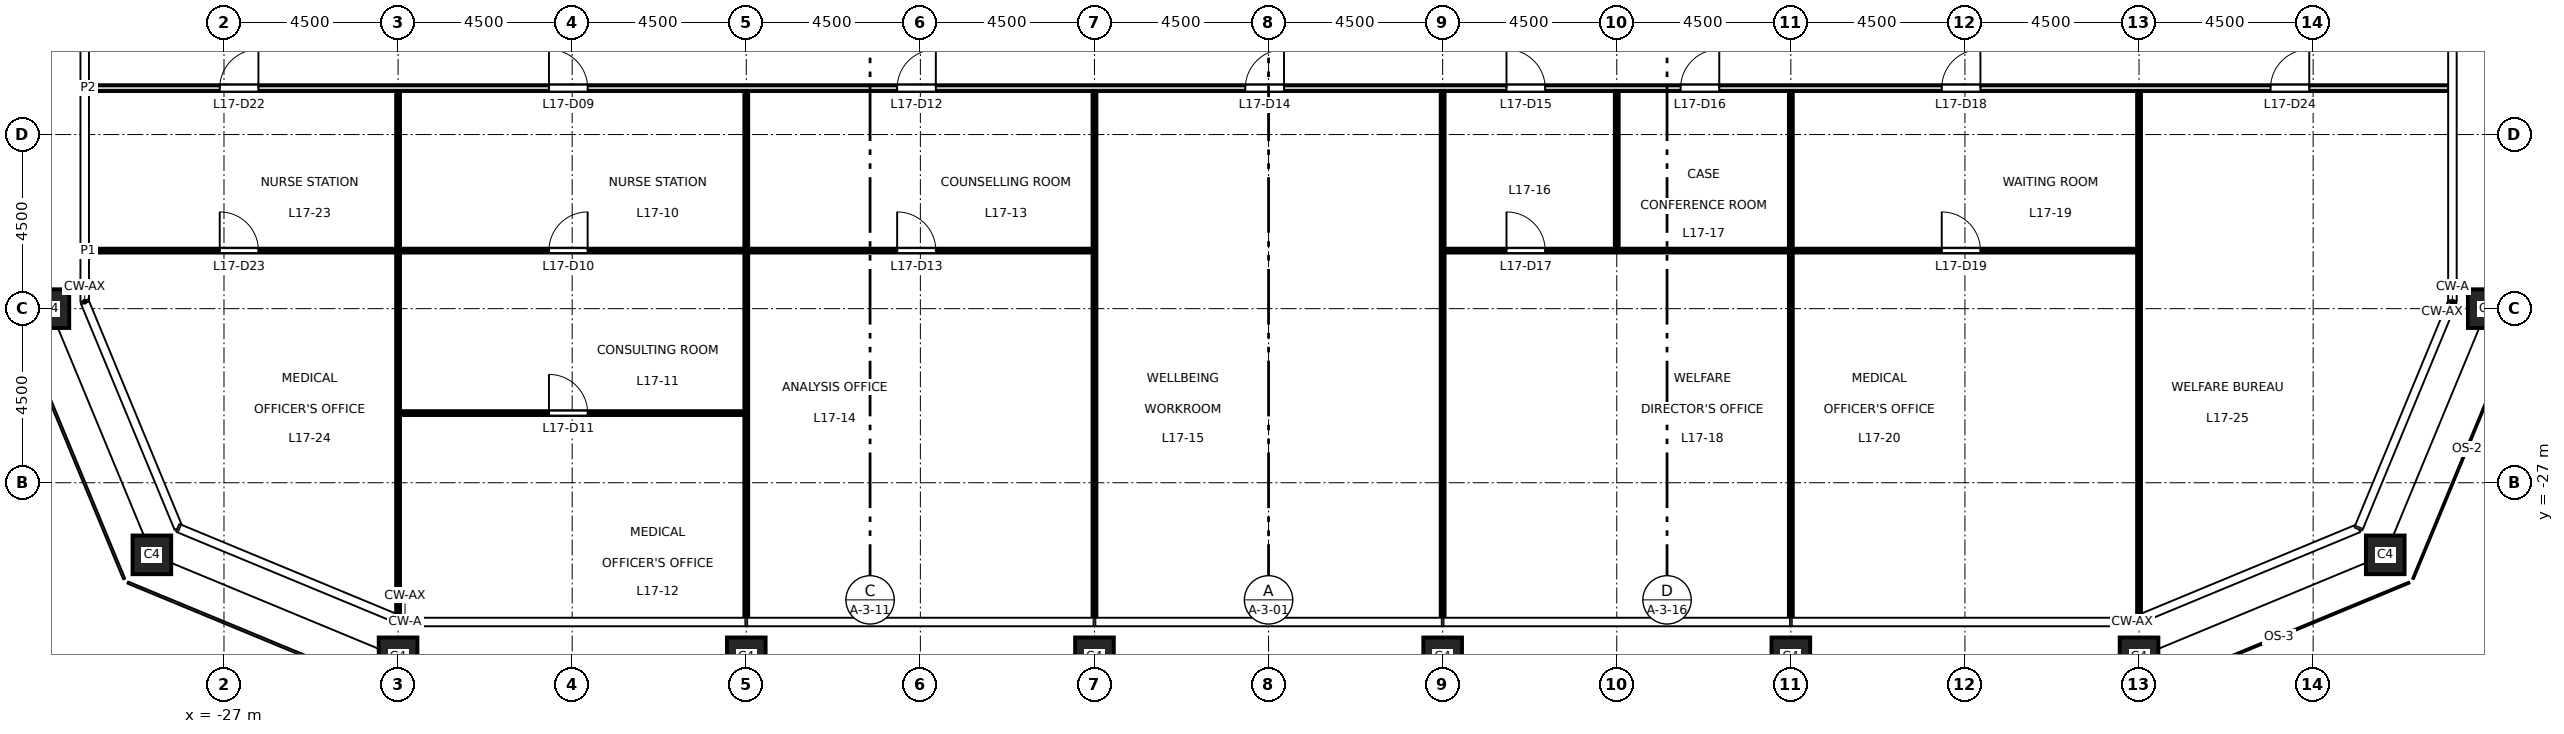
"""IFC4 building model, lengths in metres.
Left out: names, types, materials, properties, quantities, classifications, styles, units other than length and angle.
Written with IfcOpenShell. Run it as: python <this file> out.ifc"""

import sys

from ifc_helpers import new_model, si_unit, direction, frame, frame_2d, origin, origin_2d, place, context, subcontext, project, spatial, rectangle, hollow_rectangle, extrude, element, fill, save


model = new_model("IFC4")
c1 = context("Model", 3, precision=1e-05, world=origin(), true_north=direction((0.0, 1.0)))
c2 = subcontext(c1, "Body", "Model", "MODEL_VIEW")
j1 = project(units=[si_unit("LENGTHUNIT", "METRE"), si_unit("PLANEANGLEUNIT", "RADIAN")], contexts=[c1])
p1 = place(None, origin())
s1 = spatial("IfcSite", under=j1, at=p1, CompositionType="ELEMENT")
p2 = place(p1, origin())
s2 = spatial("IfcBuilding", under=s1, at=p2, CompositionType="ELEMENT")
p3 = place(p2, frame((0.0, 0.0, 80.7)))
s3 = spatial("IfcBuildingStorey", under=s2, at=p3, CompositionType="ELEMENT", Elevation=80.7)
for number, where, z_axis, x_axis in (
    (1, (-22.5, -31.5, 0.0), (0.0, 0.0, 1.0), (1.0, 0.0, 0.0)),
    (2, (-13.5, -31.5, 0.0), (0.0, 0.0, 1.0), (1.0, 0.0, 0.0)),
    (3, (-4.5, -31.5, 0.0), (0.0, 0.0, 1.0), (1.0, 0.0, 0.0)),
    (4, (4.5, -31.5, 0.0), (0.0, 0.0, 1.0), (1.0, 0.0, 0.0)),
    (5, (13.5, -31.5, 0.0), (0.0, 0.0, 1.0), (1.0, 0.0, 0.0)),
    (6, (22.5, -31.5, 0.0), (0.0, 0.0, 1.0), (1.0, 0.0, 0.0)),
    (7, (28.864, -28.864, 0.0), (0.0, 0.0, 1.0), (1.0, 0.0, 0.0)),
    (8, (31.5, -22.5, 0.0), (0.0, 0.0, 1.0), (1.0, 0.0, 0.0)),
    (9, (-31.5, -22.5, 0.0), (0.0, 0.0, 1.0), (1.0, 0.0, 0.0)),
    (10, (-28.864, -28.864, 0.0), (0.0, 0.0, 1.0), (1.0, 0.0, 0.0)),
):
    element("IfcColumn", number, at=place(p3, frame(where, z_axis=z_axis, x_axis=x_axis)), inside=s3, PredefinedType="COLUMN", context=c2, shape_type="SweptSolid", body=[
        extrude(hollow_rectangle(XDim=1.0, YDim=1.0, WallThickness=0.06, at=origin_2d()), origin(), (0.0, 0.0, 1.0), 4.5),
    ])
p4 = place(p3, frame((-22.45, -25.2, 0.0), z_axis=(0.0, 0.0, 1.0), x_axis=(1.0, 0.0, 0.0)))
e11 = element("IfcWall", 11, at=p4, inside=s3, PredefinedType="PARTITIONING", context=c2, shape_type="SweptSolid", body=[
    extrude(rectangle(XDim=8.9, YDim=0.1, at=frame_2d((4.45, 0.0))), origin(), (0.0, 0.0, 1.0), 4.35),
])
p5 = place(p4, frame((3.85, 0.0, 0.0)))
e12 = element("IfcOpeningElement", 12, at=p5, cuts=e11, PredefinedType="OPENING", context=c2, shape_type="SweptSolid", body=[
    extrude(rectangle(XDim=1.0, YDim=2.1, at=frame_2d((0.5, 1.05))), frame((0.0, 0.06, 0.0), z_axis=(0.0, -1.0, 0.0), x_axis=(1.0, 0.0, 0.0)), (0.0, 0.0, 1.0), 0.12),
])
p6 = place(p3, frame((-30.51, -21.0, 0.0), z_axis=(0.0, 0.0, 1.0), x_axis=(1.0, 0.0, 0.0)))
e13 = element("IfcWall", 13, at=p6, inside=s3, PredefinedType="PARTITIONING", context=c2, shape_type="SweptSolid", body=[
    extrude(rectangle(XDim=25.96, YDim=0.1, at=frame_2d((12.98, 0.0))), origin(), (0.0, 0.0, 1.0), 4.35),
])
p7 = place(p6, frame((11.91, 0.0, 0.0)))
e14 = element("IfcOpeningElement", 14, at=p7, cuts=e13, PredefinedType="OPENING", context=c2, shape_type="SweptSolid", body=[
    extrude(rectangle(XDim=1.0, YDim=2.1, at=frame_2d((0.5, 1.05))), frame((0.0, 0.06, 0.0), z_axis=(0.0, -1.0, 0.0), x_axis=(1.0, 0.0, 0.0)), (0.0, 0.0, 1.0), 0.12),
])
p8 = place(p6, frame((20.91, 0.0, 0.0)))
e15 = element("IfcOpeningElement", 15, at=p8, cuts=e13, PredefinedType="OPENING", context=c2, shape_type="SweptSolid", body=[
    extrude(rectangle(XDim=1.0, YDim=2.1, at=frame_2d((0.5, 1.05))), frame((0.0, 0.06, 0.0), z_axis=(0.0, -1.0, 0.0), x_axis=(1.0, 0.0, 0.0)), (0.0, 0.0, 1.0), 0.12),
])
p9 = place(p6, frame((3.4, 0.0, 0.0)))
e16 = element("IfcOpeningElement", 16, at=p9, cuts=e13, PredefinedType="OPENING", context=c2, shape_type="SweptSolid", body=[
    extrude(rectangle(XDim=1.0, YDim=2.1, at=frame_2d((0.5, 1.05))), frame((0.0, 0.06, 0.0), z_axis=(0.0, -1.0, 0.0), x_axis=(1.0, 0.0, 0.0)), (0.0, 0.0, 1.0), 0.12),
])
p10 = place(p3, frame((4.55, -21.0, 0.0), z_axis=(0.0, 0.0, 1.0), x_axis=(1.0, 0.0, 0.0)))
e17 = element("IfcWall", 17, at=p10, inside=s3, PredefinedType="PARTITIONING", context=c2, shape_type="SweptSolid", body=[
    extrude(rectangle(XDim=17.9, YDim=0.1, at=frame_2d((8.95, 0.0))), origin(), (0.0, 0.0, 1.0), 4.35),
])
p11 = place(p10, frame((1.6, 0.0, 0.0)))
e18 = element("IfcOpeningElement", 18, at=p11, cuts=e17, PredefinedType="OPENING", context=c2, shape_type="SweptSolid", body=[
    extrude(rectangle(XDim=1.0, YDim=2.1, at=frame_2d((0.5, 1.05))), frame((0.0, 0.06, 0.0), z_axis=(0.0, -1.0, 0.0), x_axis=(1.0, 0.0, 0.0)), (0.0, 0.0, 1.0), 0.12),
])
p12 = place(p10, frame((12.85, 0.0, 0.0)))
e19 = element("IfcOpeningElement", 19, at=p12, cuts=e17, PredefinedType="OPENING", context=c2, shape_type="SweptSolid", body=[
    extrude(rectangle(XDim=1.0, YDim=2.1, at=frame_2d((0.5, 1.05))), frame((0.0, 0.06, 0.0), z_axis=(0.0, -1.0, 0.0), x_axis=(1.0, 0.0, 0.0)), (0.0, 0.0, 1.0), 0.12),
])
p13 = place(p3, frame((-30.51, -16.8, 0.0), z_axis=(0.0, 0.0, 1.0), x_axis=(1.0, 0.0, 0.0)))
e20 = element("IfcWall", 20, at=p13, inside=s3, PredefinedType="PARTITIONING", context=c2, shape_type="SweptSolid", body=[
    extrude(rectangle(XDim=61.02, YDim=0.15, at=frame_2d((30.51, 0.0))), origin(), (0.0, 0.0, 1.0), 4.35),
])
p14 = place(p13, frame((11.91, 0.0, 0.0)))
e21 = element("IfcOpeningElement", 21, at=p14, cuts=e20, PredefinedType="OPENING", context=c2, shape_type="SweptSolid", body=[
    extrude(rectangle(XDim=1.0, YDim=2.1, at=frame_2d((0.5, 1.05))), frame((0.0, 0.085, 0.0), z_axis=(0.0, -1.0, 0.0), x_axis=(1.0, 0.0, 0.0)), (0.0, 0.0, 1.0), 0.17),
])
p15 = place(p13, frame((20.91, 0.0, 0.0)))
e22 = element("IfcOpeningElement", 22, at=p15, cuts=e20, PredefinedType="OPENING", context=c2, shape_type="SweptSolid", body=[
    extrude(rectangle(XDim=1.0, YDim=2.1, at=frame_2d((0.5, 1.05))), frame((0.0, 0.085, 0.0), z_axis=(0.0, -1.0, 0.0), x_axis=(1.0, 0.0, 0.0)), (0.0, 0.0, 1.0), 0.17),
])
p16 = place(p13, frame((29.91, 0.0, 0.0)))
e23 = element("IfcOpeningElement", 23, at=p16, cuts=e20, PredefinedType="OPENING", context=c2, shape_type="SweptSolid", body=[
    extrude(rectangle(XDim=1.0, YDim=2.1, at=frame_2d((0.5, 1.05))), frame((0.0, 0.085, 0.0), z_axis=(0.0, -1.0, 0.0), x_axis=(1.0, 0.0, 0.0)), (0.0, 0.0, 1.0), 0.17),
])
p17 = place(p13, frame((36.66, 0.0, 0.0)))
e24 = element("IfcOpeningElement", 24, at=p17, cuts=e20, PredefinedType="OPENING", context=c2, shape_type="SweptSolid", body=[
    extrude(rectangle(XDim=1.0, YDim=2.1, at=frame_2d((0.5, 1.05))), frame((0.0, 0.085, 0.0), z_axis=(0.0, -1.0, 0.0), x_axis=(1.0, 0.0, 0.0)), (0.0, 0.0, 1.0), 0.17),
])
p18 = place(p13, frame((41.16, 0.0, 0.0)))
e25 = element("IfcOpeningElement", 25, at=p18, cuts=e20, PredefinedType="OPENING", context=c2, shape_type="SweptSolid", body=[
    extrude(rectangle(XDim=1.0, YDim=2.1, at=frame_2d((0.5, 1.05))), frame((0.0, 0.085, 0.0), z_axis=(0.0, -1.0, 0.0), x_axis=(1.0, 0.0, 0.0)), (0.0, 0.0, 1.0), 0.17),
])
p19 = place(p13, frame((47.91, 0.0, 0.0)))
e26 = element("IfcOpeningElement", 26, at=p19, cuts=e20, PredefinedType="OPENING", context=c2, shape_type="SweptSolid", body=[
    extrude(rectangle(XDim=1.0, YDim=2.1, at=frame_2d((0.5, 1.05))), frame((0.0, 0.085, 0.0), z_axis=(0.0, -1.0, 0.0), x_axis=(1.0, 0.0, 0.0)), (0.0, 0.0, 1.0), 0.17),
])
p20 = place(p13, frame((3.4, 0.0, 0.0)))
e27 = element("IfcOpeningElement", 27, at=p20, cuts=e20, PredefinedType="OPENING", context=c2, shape_type="SweptSolid", body=[
    extrude(rectangle(XDim=1.0, YDim=2.1, at=frame_2d((0.5, 1.05))), frame((0.0, 0.085, 0.0), z_axis=(0.0, -1.0, 0.0), x_axis=(1.0, 0.0, 0.0)), (0.0, 0.0, 1.0), 0.17),
])
p21 = place(p13, frame((56.41, 0.0, 0.0)))
e28 = element("IfcOpeningElement", 28, at=p21, cuts=e20, PredefinedType="OPENING", context=c2, shape_type="SweptSolid", body=[
    extrude(rectangle(XDim=1.0, YDim=2.1, at=frame_2d((0.5, 1.05))), frame((0.0, 0.085, 0.0), z_axis=(0.0, -1.0, 0.0), x_axis=(1.0, 0.0, 0.0)), (0.0, 0.0, 1.0), 0.17),
])
p22 = place(p3, frame((-22.5, -30.428, 0.0), z_axis=(0.0, 0.0, 1.0), x_axis=(0.0, 1.0, 0.0)))
e29 = element("IfcWall", 29, at=p22, inside=s3, PredefinedType="PARTITIONING", context=c2, shape_type="SweptSolid", body=[
    extrude(rectangle(XDim=9.378, YDim=0.1, at=frame_2d((4.689, 0.0))), origin(), (0.0, 0.0, 1.0), 3.35),
])
p23 = place(p3, frame((-22.5, -20.95, 0.0), z_axis=(0.0, 0.0, 1.0), x_axis=(0.0, 1.0, 0.0)))
e30 = element("IfcWall", 30, at=p23, inside=s3, PredefinedType="PARTITIONING", context=c2, shape_type="SweptSolid", body=[
    extrude(rectangle(XDim=4.075, YDim=0.1, at=frame_2d((2.038, 0.0))), origin(), (0.0, 0.0, 1.0), 3.35),
])
p24 = place(p3, frame((-13.5, -30.51, 0.0), z_axis=(0.0, 0.0, 1.0), x_axis=(0.0, 1.0, 0.0)))
e31 = element("IfcWall", 31, at=p24, inside=s3, PredefinedType="PARTITIONING", context=c2, shape_type="SweptSolid", body=[
    extrude(rectangle(XDim=9.46, YDim=0.1, at=frame_2d((4.73, 0.0))), origin(), (0.0, 0.0, 1.0), 3.35),
])
p25 = place(p3, frame((-13.5, -20.95, 0.0), z_axis=(0.0, 0.0, 1.0), x_axis=(0.0, 1.0, 0.0)))
e32 = element("IfcWall", 32, at=p25, inside=s3, PredefinedType="PARTITIONING", context=c2, shape_type="SweptSolid", body=[
    extrude(rectangle(XDim=4.075, YDim=0.1, at=frame_2d((2.038, 0.0))), origin(), (0.0, 0.0, 1.0), 3.35),
])
for number, where, z_axis, x_axis in (
    (33, (-4.5, -30.51, 0.0), (0.0, 0.0, 1.0), (0.0, 1.0, 0.0)),
    (34, (4.5, -30.51, 0.0), (0.0, 0.0, 1.0), (0.0, 1.0, 0.0)),
):
    element("IfcWall", number, at=place(p3, frame(where, z_axis=z_axis, x_axis=x_axis)), inside=s3, PredefinedType="PARTITIONING", context=c2, shape_type="SweptSolid", body=[
        extrude(rectangle(XDim=13.635, YDim=0.1, at=frame_2d((6.817, 0.0))), origin(), (0.0, 0.0, 1.0), 3.35),
    ])
p26 = place(p3, frame((9.0, -20.95, 0.0), z_axis=(0.0, 0.0, 1.0), x_axis=(0.0, 1.0, 0.0)))
e35 = element("IfcWall", 35, at=p26, inside=s3, PredefinedType="PARTITIONING", context=c2, shape_type="SweptSolid", body=[
    extrude(rectangle(XDim=4.075, YDim=0.1, at=frame_2d((2.038, 0.0))), origin(), (0.0, 0.0, 1.0), 4.35),
])
p27 = place(p3, frame((13.5, -30.51, 0.0), z_axis=(0.0, 0.0, 1.0), x_axis=(0.0, 1.0, 0.0)))
e36 = element("IfcWall", 36, at=p27, inside=s3, PredefinedType="PARTITIONING", context=c2, shape_type="SweptSolid", body=[
    extrude(rectangle(XDim=9.46, YDim=0.1, at=frame_2d((4.73, 0.0))), origin(), (0.0, 0.0, 1.0), 3.35),
])
p28 = place(p3, frame((13.5, -20.95, 0.0), z_axis=(0.0, 0.0, 1.0), x_axis=(0.0, 1.0, 0.0)))
e37 = element("IfcWall", 37, at=p28, inside=s3, PredefinedType="PARTITIONING", context=c2, shape_type="SweptSolid", body=[
    extrude(rectangle(XDim=4.075, YDim=0.1, at=frame_2d((2.038, 0.0))), origin(), (0.0, 0.0, 1.0), 3.35),
])
p29 = place(p3, frame((22.5, -30.428, 0.0), z_axis=(0.0, 0.0, 1.0), x_axis=(0.0, 1.0, 0.0)))
e38 = element("IfcWall", 38, at=p29, inside=s3, PredefinedType="PARTITIONING", context=c2, shape_type="SweptSolid", body=[
    extrude(rectangle(XDim=13.553, YDim=0.1, at=frame_2d((6.776, 0.0))), origin(), (0.0, 0.0, 1.0), 3.35),
])
p30 = place(p14, origin())
e39 = element("IfcDoor", 39, at=p30, inside=s3, OperationType="SINGLE_SWING_LEFT", PredefinedType="DOOR", context=c2, shape_type="SweptSolid", body=[
    extrude(rectangle(XDim=1.0, YDim=2.1, at=frame_2d((0.5, 1.05))), frame((0.0, 0.025, 0.0), z_axis=(0.0, -1.0, 0.0), x_axis=(1.0, 0.0, 0.0)), (0.0, 0.0, 1.0), 0.05),
])
fill(e21, e39)
p31 = place(p7, origin())
e40 = element("IfcDoor", 40, at=p31, inside=s3, OperationType="SINGLE_SWING_RIGHT", PredefinedType="DOOR", context=c2, shape_type="SweptSolid", body=[
    extrude(rectangle(XDim=1.0, YDim=2.1, at=frame_2d((0.5, 1.05))), frame((0.0, 0.025, 0.0), z_axis=(0.0, -1.0, 0.0), x_axis=(1.0, 0.0, 0.0)), (0.0, 0.0, 1.0), 0.05),
])
fill(e14, e40)
p32 = place(p5, origin())
e41 = element("IfcDoor", 41, at=p32, inside=s3, OperationType="SINGLE_SWING_LEFT", PredefinedType="DOOR", context=c2, shape_type="SweptSolid", body=[
    extrude(rectangle(XDim=1.0, YDim=2.1, at=frame_2d((0.5, 1.05))), frame((0.0, 0.025, 0.0), z_axis=(0.0, -1.0, 0.0), x_axis=(1.0, 0.0, 0.0)), (0.0, 0.0, 1.0), 0.05),
])
fill(e12, e41)
p33 = place(p15, origin())
e42 = element("IfcDoor", 42, at=p33, inside=s3, OperationType="SINGLE_SWING_RIGHT", PredefinedType="DOOR", context=c2, shape_type="SweptSolid", body=[
    extrude(rectangle(XDim=1.0, YDim=2.1, at=frame_2d((0.5, 1.05))), frame((0.0, 0.025, 0.0), z_axis=(0.0, -1.0, 0.0), x_axis=(1.0, 0.0, 0.0)), (0.0, 0.0, 1.0), 0.05),
])
fill(e22, e42)
p34 = place(p8, origin())
e43 = element("IfcDoor", 43, at=p34, inside=s3, OperationType="SINGLE_SWING_LEFT", PredefinedType="DOOR", context=c2, shape_type="SweptSolid", body=[
    extrude(rectangle(XDim=1.0, YDim=2.1, at=frame_2d((0.5, 1.05))), frame((0.0, 0.025, 0.0), z_axis=(0.0, -1.0, 0.0), x_axis=(1.0, 0.0, 0.0)), (0.0, 0.0, 1.0), 0.05),
])
fill(e15, e43)
p35 = place(p16, origin())
e44 = element("IfcDoor", 44, at=p35, inside=s3, OperationType="SINGLE_SWING_RIGHT", PredefinedType="DOOR", context=c2, shape_type="SweptSolid", body=[
    extrude(rectangle(XDim=1.0, YDim=2.1, at=frame_2d((0.5, 1.05))), frame((0.0, 0.025, 0.0), z_axis=(0.0, -1.0, 0.0), x_axis=(1.0, 0.0, 0.0)), (0.0, 0.0, 1.0), 0.05),
])
fill(e23, e44)
p36 = place(p17, origin())
e45 = element("IfcDoor", 45, at=p36, inside=s3, OperationType="SINGLE_SWING_LEFT", PredefinedType="DOOR", context=c2, shape_type="SweptSolid", body=[
    extrude(rectangle(XDim=1.0, YDim=2.1, at=frame_2d((0.5, 1.05))), frame((0.0, 0.025, 0.0), z_axis=(0.0, -1.0, 0.0), x_axis=(1.0, 0.0, 0.0)), (0.0, 0.0, 1.0), 0.05),
])
fill(e24, e45)
p37 = place(p18, origin())
e46 = element("IfcDoor", 46, at=p37, inside=s3, OperationType="SINGLE_SWING_RIGHT", PredefinedType="DOOR", context=c2, shape_type="SweptSolid", body=[
    extrude(rectangle(XDim=1.0, YDim=2.1, at=frame_2d((0.5, 1.05))), frame((0.0, 0.025, 0.0), z_axis=(0.0, -1.0, 0.0), x_axis=(1.0, 0.0, 0.0)), (0.0, 0.0, 1.0), 0.05),
])
fill(e25, e46)
p38 = place(p11, origin())
e47 = element("IfcDoor", 47, at=p38, inside=s3, OperationType="SINGLE_SWING_LEFT", PredefinedType="DOOR", context=c2, shape_type="SweptSolid", body=[
    extrude(rectangle(XDim=1.0, YDim=2.1, at=frame_2d((0.5, 1.05))), frame((0.0, 0.025, 0.0), z_axis=(0.0, -1.0, 0.0), x_axis=(1.0, 0.0, 0.0)), (0.0, 0.0, 1.0), 0.05),
])
fill(e18, e47)
p39 = place(p19, origin())
e48 = element("IfcDoor", 48, at=p39, inside=s3, OperationType="SINGLE_SWING_RIGHT", PredefinedType="DOOR", context=c2, shape_type="SweptSolid", body=[
    extrude(rectangle(XDim=1.0, YDim=2.1, at=frame_2d((0.5, 1.05))), frame((0.0, 0.025, 0.0), z_axis=(0.0, -1.0, 0.0), x_axis=(1.0, 0.0, 0.0)), (0.0, 0.0, 1.0), 0.05),
])
fill(e26, e48)
p40 = place(p12, origin())
e49 = element("IfcDoor", 49, at=p40, inside=s3, OperationType="SINGLE_SWING_LEFT", PredefinedType="DOOR", context=c2, shape_type="SweptSolid", body=[
    extrude(rectangle(XDim=1.0, YDim=2.1, at=frame_2d((0.5, 1.05))), frame((0.0, 0.025, 0.0), z_axis=(0.0, -1.0, 0.0), x_axis=(1.0, 0.0, 0.0)), (0.0, 0.0, 1.0), 0.05),
])
fill(e19, e49)
p41 = place(p20, origin())
e50 = element("IfcDoor", 50, at=p41, inside=s3, OperationType="SINGLE_SWING_RIGHT", PredefinedType="DOOR", context=c2, shape_type="SweptSolid", body=[
    extrude(rectangle(XDim=1.0, YDim=2.1, at=frame_2d((0.5, 1.05))), frame((0.0, 0.025, 0.0), z_axis=(0.0, -1.0, 0.0), x_axis=(1.0, 0.0, 0.0)), (0.0, 0.0, 1.0), 0.05),
])
fill(e27, e50)
p42 = place(p9, origin())
e51 = element("IfcDoor", 51, at=p42, inside=s3, OperationType="SINGLE_SWING_LEFT", PredefinedType="DOOR", context=c2, shape_type="SweptSolid", body=[
    extrude(rectangle(XDim=1.0, YDim=2.1, at=frame_2d((0.5, 1.05))), frame((0.0, 0.025, 0.0), z_axis=(0.0, -1.0, 0.0), x_axis=(1.0, 0.0, 0.0)), (0.0, 0.0, 1.0), 0.05),
])
fill(e16, e51)
p43 = place(p21, origin())
e52 = element("IfcDoor", 52, at=p43, inside=s3, OperationType="SINGLE_SWING_RIGHT", PredefinedType="DOOR", context=c2, shape_type="SweptSolid", body=[
    extrude(rectangle(XDim=1.0, YDim=2.1, at=frame_2d((0.5, 1.05))), frame((0.0, 0.025, 0.0), z_axis=(0.0, -1.0, 0.0), x_axis=(1.0, 0.0, 0.0)), (0.0, 0.0, 1.0), 0.05),
])
fill(e28, e52)
save(model, sys.argv[1])
